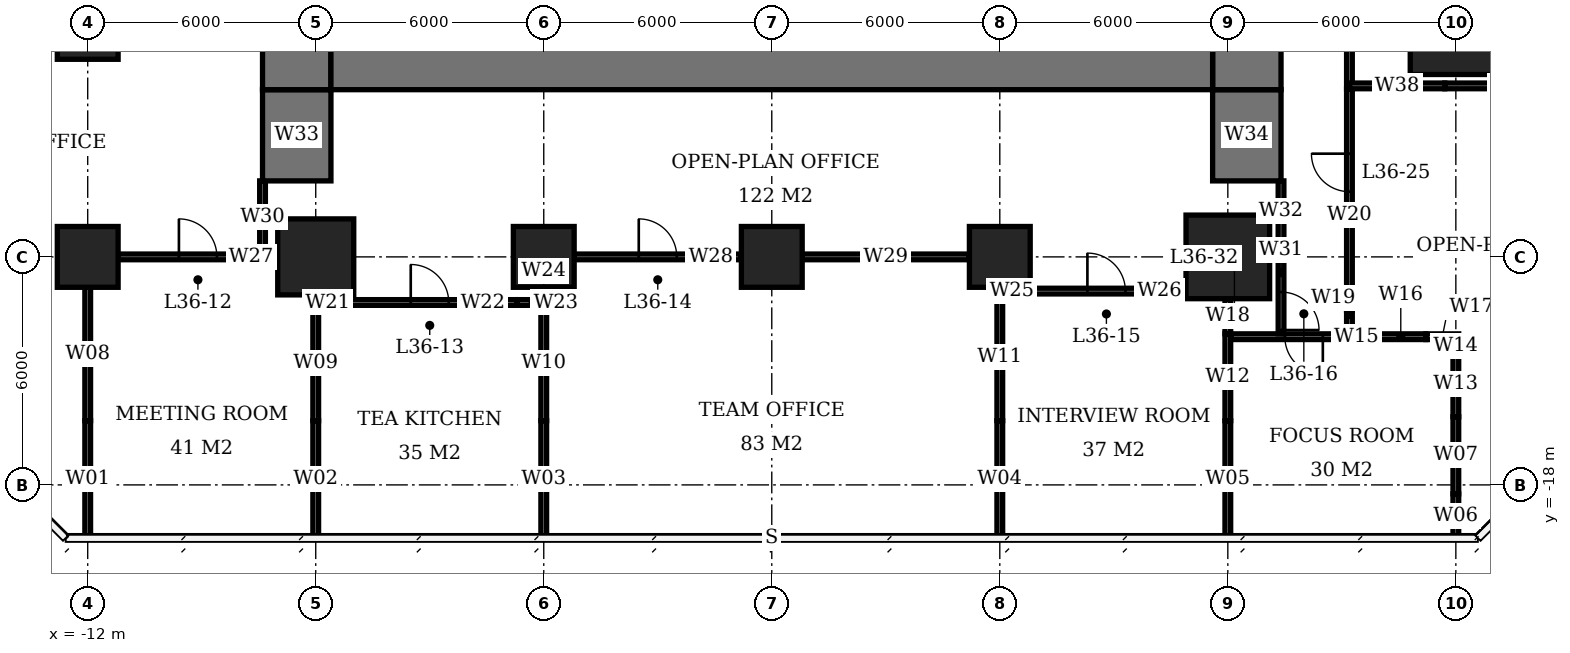
"""IFC4 building model, lengths in metres.
Left out: names, types, materials, properties, quantities, classifications, styles, units other than length and angle.
Written with IfcOpenShell. Run it as: python <this file> out.ifc"""

import sys

from ifc_helpers import new_model, si_unit, direction, frame, frame_2d, origin, origin_2d, place, context, subcontext, project, spatial, rectangle, extrude, element, fill, save


model = new_model("IFC4")
c1 = context("Model", 3, precision=1e-05, world=origin(), true_north=direction((0.0, 1.0)))
c2 = subcontext(c1, "Body", "Model", "MODEL_VIEW")
j1 = project(units=[si_unit("LENGTHUNIT", "METRE"), si_unit("PLANEANGLEUNIT", "RADIAN")], contexts=[c1])
p1 = place(None, origin())
s1 = spatial("IfcSite", under=j1, at=p1, CompositionType="ELEMENT")
p2 = place(p1, origin())
s2 = spatial("IfcBuilding", under=s1, at=p2, CompositionType="ELEMENT")
p3 = place(p2, frame((0.0, 0.0, 148.4)))
s3 = spatial("IfcBuildingStorey", under=s2, at=p3, CompositionType="ELEMENT", Elevation=148.4)
for number, where, z_axis, x_axis in (
    (1, (-12.0, -12.0, 0.0), (0.0, 0.0, 1.0), (1.0, 0.0, 0.0)),
    (2, (-12.0, -6.0, 0.0), (0.0, 0.0, 1.0), (1.0, 0.0, 0.0)),
):
    element("IfcColumn", number, at=place(p3, frame(where, z_axis=z_axis, x_axis=x_axis)), inside=s3, PredefinedType="COLUMN", context=c2, shape_type="SweptSolid", body=[
        extrude(rectangle(XDim=1.6, YDim=1.6, at=origin_2d()), origin(), (0.0, 0.0, 1.0), 3.9),
    ])
p4 = place(p3, frame((-6.0, -12.0, 0.0), z_axis=(0.0, 0.0, 1.0), x_axis=(1.0, 0.0, 0.0)))
e3 = element("IfcColumn", 3, at=p4, inside=s3, PredefinedType="COLUMN", context=c2, shape_type="SweptSolid", body=[
    extrude(rectangle(XDim=2.0, YDim=2.0, at=origin_2d()), origin(), (0.0, 0.0, 1.0), 3.9),
])
for number, where, z_axis, x_axis in (
    (4, (0.0, -12.0, 0.0), (0.0, 0.0, 1.0), (1.0, 0.0, 0.0)),
    (5, (6.0, -12.0, 0.0), (0.0, 0.0, 1.0), (1.0, 0.0, 0.0)),
    (6, (12.0, -12.0, 0.0), (0.0, 0.0, 1.0), (1.0, 0.0, 0.0)),
):
    element("IfcColumn", number, at=place(p3, frame(where, z_axis=z_axis, x_axis=x_axis)), inside=s3, PredefinedType="COLUMN", context=c2, shape_type="SweptSolid", body=[
        extrude(rectangle(XDim=1.6, YDim=1.6, at=origin_2d()), origin(), (0.0, 0.0, 1.0), 3.9),
    ])
p5 = place(p3, frame((18.0, -12.0, 0.0), z_axis=(0.0, 0.0, 1.0), x_axis=(1.0, 0.0, 0.0)))
e7 = element("IfcColumn", 7, at=p5, inside=s3, PredefinedType="COLUMN", context=c2, shape_type="SweptSolid", body=[
    extrude(rectangle(XDim=2.2, YDim=2.2, at=origin_2d()), origin(), (0.0, 0.0, 1.0), 3.9),
])
p6 = place(p3, frame((24.0, -6.0, 0.0), z_axis=(0.0, 0.0, 1.0), x_axis=(1.0, 0.0, 0.0)))
e8 = element("IfcColumn", 8, at=p6, inside=s3, PredefinedType="COLUMN", context=c2, shape_type="SweptSolid", body=[
    extrude(rectangle(XDim=2.4, YDim=2.4, at=origin_2d()), origin(), (0.0, 0.0, 1.0), 3.9),
])
p7 = place(p3, frame((-5.6, -6.6, 0.0), z_axis=(0.0, 0.0, 1.0), x_axis=(1.0, 0.0, 0.0)))
e9 = element("IfcWall", 9, at=p7, inside=s3, PredefinedType="SHEAR", context=c2, shape_type="SweptSolid", body=[
    extrude(rectangle(XDim=23.2, YDim=2.0, at=frame_2d((11.6, 0.0))), origin(), (0.0, 0.0, 1.0), 3.9),
])
p8 = place(p3, frame((-6.5, -7.6, 0.0), z_axis=(0.0, 0.0, 1.0), x_axis=(0.0, 1.0, 0.0)))
e10 = element("IfcWall", 10, at=p8, inside=s3, PredefinedType="SHEAR", context=c2, shape_type="SweptSolid", body=[
    extrude(rectangle(XDim=21.2, YDim=1.8, at=frame_2d((10.6, 0.0))), origin(), (0.0, 0.0, 1.0), 3.9),
])
p9 = place(p8, frame((7.8, 0.0, 0.0)))
e11 = element("IfcOpeningElement", 11, at=p9, cuts=e10, PredefinedType="OPENING", context=c2, shape_type="SweptSolid", body=[
    extrude(rectangle(XDim=1.8, YDim=2.4, at=frame_2d((0.9, 1.2))), frame((0.0, 0.91, 0.0), z_axis=(0.0, -1.0, 0.0), x_axis=(1.0, 0.0, 0.0)), (0.0, 0.0, 1.0), 1.82),
])
p10 = place(p3, frame((18.5, -7.6, 0.0), z_axis=(0.0, 0.0, 1.0), x_axis=(0.0, 1.0, 0.0)))
e12 = element("IfcWall", 12, at=p10, inside=s3, PredefinedType="SHEAR", context=c2, shape_type="SweptSolid", body=[
    extrude(rectangle(XDim=21.2, YDim=1.8, at=frame_2d((10.6, 0.0))), origin(), (0.0, 0.0, 1.0), 3.9),
])
p11 = place(p10, frame((9.2, 0.0, 0.0)))
e13 = element("IfcOpeningElement", 13, at=p11, cuts=e12, PredefinedType="OPENING", context=c2, shape_type="SweptSolid", body=[
    extrude(rectangle(XDim=1.8, YDim=2.4, at=frame_2d((0.9, 1.2))), frame((0.0, 0.91, 0.0), z_axis=(0.0, -1.0, 0.0), x_axis=(1.0, 0.0, 0.0)), (0.0, 0.0, 1.0), 1.82),
])
for number, where, z_axis, x_axis in (
    (14, (-6.5, -10.0, 0.0), (0.0, 0.0, 1.0), (0.0, 1.0, 0.0)),
    (15, (18.5, -10.0, 0.0), (0.0, 0.0, 1.0), (0.0, 1.0, 0.0)),
):
    element("IfcWall", number, at=place(p3, frame(where, z_axis=z_axis, x_axis=x_axis)), inside=s3, PredefinedType="SHEAR", context=c2, shape_type="SweptSolid", body=[
        extrude(rectangle(XDim=2.4, YDim=1.8, at=frame_2d((1.2, 0.0))), origin(), (0.0, 0.0, 1.0), 3.9),
    ])
p12 = place(p3, frame((21.892, -14.1, 0.0), z_axis=(0.0, 0.0, 1.0), x_axis=(-1.0, 0.0, 0.0)))
e16 = element("IfcWall", 16, at=p12, inside=s3, PredefinedType="PARTITIONING", context=c2, shape_type="SweptSolid", body=[
    extrude(rectangle(XDim=3.817, YDim=0.15, at=frame_2d((1.909, 0.0))), origin(), (0.0, 0.0, 1.0), 2.65),
])
p13 = place(p12, frame((1.392, 0.0, 0.0)))
e17 = element("IfcOpeningElement", 17, at=p13, cuts=e16, PredefinedType="OPENING", context=c2, shape_type="SweptSolid", body=[
    extrude(rectangle(XDim=1.0, YDim=2.1, at=frame_2d((0.5, 1.05))), frame((0.0, 0.085, 0.0), z_axis=(0.0, -1.0, 0.0), x_axis=(1.0, 0.0, 0.0)), (0.0, 0.0, 1.0), 0.17),
])
p14 = place(p3, frame((21.892, -14.1, 0.0), z_axis=(0.0, 0.0, 1.0), x_axis=(1.0, 0.0, 0.0)))
e18 = element("IfcWall", 18, at=p14, inside=s3, PredefinedType="PARTITIONING", context=c2, shape_type="SweptSolid", body=[
    extrude(rectangle(XDim=1.318, YDim=0.15, at=frame_2d((0.659, 0.0))), origin(), (0.0, 0.0, 1.0), 3.65),
])
p15 = place(p3, frame((23.21, -14.1, 0.0), z_axis=(0.0, 0.0, 1.0), x_axis=(1.0, 0.0, 0.0)))
e19 = element("IfcWall", 19, at=p15, inside=s3, PredefinedType="PARTITIONING", context=c2, shape_type="SweptSolid", body=[
    extrude(rectangle(XDim=0.865, YDim=0.15, at=frame_2d((0.433, 0.0))), origin(), (0.0, 0.0, 1.0), 2.65),
])
p16 = place(p3, frame((-6.075, -13.2, 0.0), z_axis=(0.0, 0.0, 1.0), x_axis=(1.0, 0.0, 0.0)))
e20 = element("IfcWall", 20, at=p16, inside=s3, PredefinedType="PARTITIONING", context=c2, shape_type="SweptSolid", body=[
    extrude(rectangle(XDim=0.785, YDim=0.15, at=frame_2d((0.393, 0.0))), origin(), (0.0, 0.0, 1.0), 2.65),
])
p17 = place(p3, frame((-5.29, -13.2, 0.0), z_axis=(0.0, 0.0, 1.0), x_axis=(1.0, 0.0, 0.0)))
e21 = element("IfcWall", 21, at=p17, inside=s3, PredefinedType="PARTITIONING", context=c2, shape_type="SweptSolid", body=[
    extrude(rectangle(XDim=4.58, YDim=0.15, at=frame_2d((2.29, 0.0))), origin(), (0.0, 0.0, 1.0), 3.65),
])
p18 = place(p17, frame((1.79, 0.0, 0.0)))
e22 = element("IfcOpeningElement", 22, at=p18, cuts=e21, PredefinedType="OPENING", context=c2, shape_type="SweptSolid", body=[
    extrude(rectangle(XDim=1.0, YDim=2.1, at=frame_2d((0.5, 1.05))), frame((0.0, 0.085, 0.0), z_axis=(0.0, -1.0, 0.0), x_axis=(1.0, 0.0, 0.0)), (0.0, 0.0, 1.0), 0.17),
])
p19 = place(p3, frame((-0.71, -13.2, 0.0), z_axis=(0.0, 0.0, 1.0), x_axis=(1.0, 0.0, 0.0)))
e23 = element("IfcWall", 23, at=p19, inside=s3, PredefinedType="PARTITIONING", context=c2, shape_type="SweptSolid", body=[
    extrude(rectangle(XDim=0.86, YDim=0.15, at=frame_2d((0.43, 0.0))), origin(), (0.0, 0.0, 1.0), 2.65),
])
p20 = place(p3, frame((11.925, -12.9, 0.0), z_axis=(0.0, 0.0, 1.0), x_axis=(1.0, 0.0, 0.0)))
e24 = element("IfcWall", 24, at=p20, inside=s3, PredefinedType="PARTITIONING", context=c2, shape_type="SweptSolid", body=[
    extrude(rectangle(XDim=0.785, YDim=0.15, at=frame_2d((0.393, 0.0))), origin(), (0.0, 0.0, 1.0), 2.65),
])
p21 = place(p3, frame((12.71, -12.9, 0.0), z_axis=(0.0, 0.0, 1.0), x_axis=(1.0, 0.0, 0.0)))
e25 = element("IfcWall", 25, at=p21, inside=s3, PredefinedType="PARTITIONING", context=c2, shape_type="SweptSolid", body=[
    extrude(rectangle(XDim=4.19, YDim=0.15, at=frame_2d((2.095, 0.0))), origin(), (0.0, 0.0, 1.0), 3.65),
])
p22 = place(p21, frame((1.595, 0.0, 0.0)))
e26 = element("IfcOpeningElement", 26, at=p22, cuts=e25, PredefinedType="OPENING", context=c2, shape_type="SweptSolid", body=[
    extrude(rectangle(XDim=1.0, YDim=2.1, at=frame_2d((0.5, 1.05))), frame((0.0, 0.085, 0.0), z_axis=(0.0, -1.0, 0.0), x_axis=(1.0, 0.0, 0.0)), (0.0, 0.0, 1.0), 0.17),
])
p23 = place(p3, frame((-11.2, -12.0, 0.0), z_axis=(0.0, 0.0, 1.0), x_axis=(1.0, 0.0, 0.0)))
e27 = element("IfcWall", 27, at=p23, inside=s3, PredefinedType="PARTITIONING", context=c2, shape_type="SweptSolid", body=[
    extrude(rectangle(XDim=4.2, YDim=0.15, at=frame_2d((2.1, 0.0))), origin(), (0.0, 0.0, 1.0), 3.65),
])
p24 = place(p23, frame((1.6, 0.0, 0.0)))
e28 = element("IfcOpeningElement", 28, at=p24, cuts=e27, PredefinedType="OPENING", context=c2, shape_type="SweptSolid", body=[
    extrude(rectangle(XDim=1.0, YDim=2.1, at=frame_2d((0.5, 1.05))), frame((0.0, 0.085, 0.0), z_axis=(0.0, -1.0, 0.0), x_axis=(1.0, 0.0, 0.0)), (0.0, 0.0, 1.0), 0.17),
])
p25 = place(p3, frame((0.8, -12.0, 0.0), z_axis=(0.0, 0.0, 1.0), x_axis=(1.0, 0.0, 0.0)))
e29 = element("IfcWall", 29, at=p25, inside=s3, PredefinedType="PARTITIONING", context=c2, shape_type="SweptSolid", body=[
    extrude(rectangle(XDim=4.4, YDim=0.15, at=frame_2d((2.2, 0.0))), origin(), (0.0, 0.0, 1.0), 3.65),
])
p26 = place(p25, frame((1.7, 0.0, 0.0)))
e30 = element("IfcOpeningElement", 30, at=p26, cuts=e29, PredefinedType="OPENING", context=c2, shape_type="SweptSolid", body=[
    extrude(rectangle(XDim=1.0, YDim=2.1, at=frame_2d((0.5, 1.05))), frame((0.0, 0.085, 0.0), z_axis=(0.0, -1.0, 0.0), x_axis=(1.0, 0.0, 0.0)), (0.0, 0.0, 1.0), 0.17),
])
p27 = place(p3, frame((6.8, -12.0, 0.0), z_axis=(0.0, 0.0, 1.0), x_axis=(1.0, 0.0, 0.0)))
e31 = element("IfcWall", 31, at=p27, inside=s3, PredefinedType="PARTITIONING", context=c2, shape_type="SweptSolid", body=[
    extrude(rectangle(XDim=4.4, YDim=0.15, at=frame_2d((2.2, 0.0))), origin(), (0.0, 0.0, 1.0), 3.65),
])
p28 = place(p3, frame((-12.0, -19.4, 0.0), z_axis=(0.0, 0.0, 1.0), x_axis=(0.0, 1.0, 0.0)))
e32 = element("IfcWall", 32, at=p28, inside=s3, PredefinedType="PARTITIONING", context=c2, shape_type="SweptSolid", body=[
    extrude(rectangle(XDim=3.09, YDim=0.15, at=frame_2d((1.545, 0.0))), origin(), (0.0, 0.0, 1.0), 3.65),
])
p29 = place(p3, frame((-12.0, -16.31, 0.0), z_axis=(0.0, 0.0, 1.0), x_axis=(0.0, 1.0, 0.0)))
e33 = element("IfcWall", 33, at=p29, inside=s3, PredefinedType="PARTITIONING", context=c2, shape_type="SweptSolid", body=[
    extrude(rectangle(XDim=3.51, YDim=0.15, at=frame_2d((1.755, 0.0))), origin(), (0.0, 0.0, 1.0), 2.65),
])
p30 = place(p3, frame((-6.0, -19.4, 0.0), z_axis=(0.0, 0.0, 1.0), x_axis=(0.0, 1.0, 0.0)))
e34 = element("IfcWall", 34, at=p30, inside=s3, PredefinedType="PARTITIONING", context=c2, shape_type="SweptSolid", body=[
    extrude(rectangle(XDim=3.09, YDim=0.15, at=frame_2d((1.545, 0.0))), origin(), (0.0, 0.0, 1.0), 3.65),
])
p31 = place(p3, frame((-6.0, -16.31, 0.0), z_axis=(0.0, 0.0, 1.0), x_axis=(0.0, 1.0, 0.0)))
e35 = element("IfcWall", 35, at=p31, inside=s3, PredefinedType="PARTITIONING", context=c2, shape_type="SweptSolid", body=[
    extrude(rectangle(XDim=3.035, YDim=0.15, at=frame_2d((1.518, 0.0))), origin(), (0.0, 0.0, 1.0), 2.65),
])
p32 = place(p3, frame((0.0, -19.4, 0.0), z_axis=(0.0, 0.0, 1.0), x_axis=(0.0, 1.0, 0.0)))
e36 = element("IfcWall", 36, at=p32, inside=s3, PredefinedType="PARTITIONING", context=c2, shape_type="SweptSolid", body=[
    extrude(rectangle(XDim=3.09, YDim=0.15, at=frame_2d((1.545, 0.0))), origin(), (0.0, 0.0, 1.0), 3.65),
])
p33 = place(p3, frame((0.0, -16.31, 0.0), z_axis=(0.0, 0.0, 1.0), x_axis=(0.0, 1.0, 0.0)))
e37 = element("IfcWall", 37, at=p33, inside=s3, PredefinedType="PARTITIONING", context=c2, shape_type="SweptSolid", body=[
    extrude(rectangle(XDim=3.035, YDim=0.15, at=frame_2d((1.518, 0.0))), origin(), (0.0, 0.0, 1.0), 2.65),
])
p34 = place(p3, frame((0.0, -13.125, 0.0), z_axis=(0.0, 0.0, 1.0), x_axis=(0.0, 1.0, 0.0)))
e38 = element("IfcWall", 38, at=p34, inside=s3, PredefinedType="PARTITIONING", context=c2, shape_type="SweptSolid", body=[
    extrude(rectangle(XDim=0.325, YDim=0.15, at=frame_2d((0.163, 0.0))), origin(), (0.0, 0.0, 1.0), 2.65),
])
p35 = place(p3, frame((12.0, -19.4, 0.0), z_axis=(0.0, 0.0, 1.0), x_axis=(0.0, 1.0, 0.0)))
e39 = element("IfcWall", 39, at=p35, inside=s3, PredefinedType="PARTITIONING", context=c2, shape_type="SweptSolid", body=[
    extrude(rectangle(XDim=3.09, YDim=0.15, at=frame_2d((1.545, 0.0))), origin(), (0.0, 0.0, 1.0), 3.65),
])
p36 = place(p3, frame((12.0, -16.31, 0.0), z_axis=(0.0, 0.0, 1.0), x_axis=(0.0, 1.0, 0.0)))
e40 = element("IfcWall", 40, at=p36, inside=s3, PredefinedType="PARTITIONING", context=c2, shape_type="SweptSolid", body=[
    extrude(rectangle(XDim=3.335, YDim=0.15, at=frame_2d((1.667, 0.0))), origin(), (0.0, 0.0, 1.0), 2.65),
])
p37 = place(p3, frame((18.0, -19.4, 0.0), z_axis=(0.0, 0.0, 1.0), x_axis=(0.0, 1.0, 0.0)))
e41 = element("IfcWall", 41, at=p37, inside=s3, PredefinedType="PARTITIONING", context=c2, shape_type="SweptSolid", body=[
    extrude(rectangle(XDim=3.09, YDim=0.15, at=frame_2d((1.545, 0.0))), origin(), (0.0, 0.0, 1.0), 3.65),
])
p38 = place(p3, frame((18.0, -16.31, 0.0), z_axis=(0.0, 0.0, 1.0), x_axis=(0.0, 1.0, 0.0)))
e42 = element("IfcWall", 42, at=p38, inside=s3, PredefinedType="PARTITIONING", context=c2, shape_type="SweptSolid", body=[
    extrude(rectangle(XDim=2.285, YDim=0.15, at=frame_2d((1.143, 0.0))), origin(), (0.0, 0.0, 1.0), 2.65),
])
p39 = place(p3, frame((18.0, -14.025, 0.0), z_axis=(0.0, 0.0, 1.0), x_axis=(0.0, 1.0, 0.0)))
e43 = element("IfcWall", 43, at=p39, inside=s3, PredefinedType="PARTITIONING", context=c2, shape_type="SweptSolid", body=[
    extrude(rectangle(XDim=0.925, YDim=0.15, at=frame_2d((0.462, 0.0))), origin(), (0.0, 0.0, 1.0), 2.65),
])
p40 = place(p3, frame((24.0, -19.4, 0.0), z_axis=(0.0, 0.0, 1.0), x_axis=(0.0, 1.0, 0.0)))
e44 = element("IfcWall", 44, at=p40, inside=s3, PredefinedType="PARTITIONING", context=c2, shape_type="SweptSolid", body=[
    extrude(rectangle(XDim=1.163, YDim=0.15, at=frame_2d((0.582, 0.0))), origin(), (0.0, 0.0, 1.0), 3.65),
])
p41 = place(p3, frame((24.0, -18.237, 0.0), z_axis=(0.0, 0.0, 1.0), x_axis=(0.0, 1.0, 0.0)))
e45 = element("IfcWall", 45, at=p41, inside=s3, PredefinedType="PARTITIONING", context=c2, shape_type="SweptSolid", body=[
    extrude(rectangle(XDim=2.029, YDim=0.15, at=frame_2d((1.015, 0.0))), origin(), (0.0, 0.0, 1.0), 2.65),
])
p42 = place(p3, frame((24.0, -16.208, 0.0), z_axis=(0.0, 0.0, 1.0), x_axis=(0.0, 1.0, 0.0)))
e46 = element("IfcWall", 46, at=p42, inside=s3, PredefinedType="PARTITIONING", context=c2, shape_type="SweptSolid", body=[
    extrude(rectangle(XDim=1.718, YDim=0.15, at=frame_2d((0.859, 0.0))), origin(), (0.0, 0.0, 1.0), 3.65),
])
p43 = place(p3, frame((24.0, -14.49, 0.0), z_axis=(0.0, 0.0, 1.0), x_axis=(0.0, 1.0, 0.0)))
e47 = element("IfcWall", 47, at=p43, inside=s3, PredefinedType="PARTITIONING", context=c2, shape_type="SweptSolid", body=[
    extrude(rectangle(XDim=0.315, YDim=0.15, at=frame_2d((0.157, 0.0))), origin(), (0.0, 0.0, 1.0), 2.65),
])
p44 = place(p3, frame((-7.4, -11.925, 0.0), z_axis=(0.0, 0.0, 1.0), x_axis=(0.0, 1.0, 0.0)))
e48 = element("IfcWall", 48, at=p44, inside=s3, PredefinedType="PARTITIONING", context=c2, shape_type="SweptSolid", body=[
    extrude(rectangle(XDim=1.925, YDim=0.15, at=frame_2d((0.962, 0.0))), origin(), (0.0, 0.0, 1.0), 3.65),
])
p45 = place(p3, frame((19.4, -11.608, 0.0), z_axis=(0.0, 0.0, 1.0), x_axis=(0.0, -1.0, 0.0)))
e49 = element("IfcWall", 49, at=p45, inside=s3, PredefinedType="PARTITIONING", context=c2, shape_type="SweptSolid", body=[
    extrude(rectangle(XDim=2.417, YDim=0.15, at=frame_2d((1.208, 0.0))), origin(), (0.0, 0.0, 1.0), 2.65),
])
p46 = place(p45, frame((1.317, 0.0, 0.0)))
e50 = element("IfcOpeningElement", 50, at=p46, cuts=e49, PredefinedType="OPENING", context=c2, shape_type="SweptSolid", body=[
    extrude(rectangle(XDim=1.0, YDim=2.1, at=frame_2d((0.5, 1.05))), frame((0.0, 0.085, 0.0), z_axis=(0.0, -1.0, 0.0), x_axis=(1.0, 0.0, 0.0)), (0.0, 0.0, 1.0), 0.17),
])
p47 = place(p3, frame((19.4, -11.608, 0.0), z_axis=(0.0, 0.0, 1.0), x_axis=(0.0, 1.0, 0.0)))
e51 = element("IfcWall", 51, at=p47, inside=s3, PredefinedType="PARTITIONING", context=c2, shape_type="SweptSolid", body=[
    extrude(rectangle(XDim=1.608, YDim=0.15, at=frame_2d((0.804, 0.0))), origin(), (0.0, 0.0, 1.0), 3.65),
])
p48 = place(p3, frame((21.2, -14.025, 0.0), z_axis=(0.0, 0.0, 1.0), x_axis=(0.0, 1.0, 0.0)))
e52 = element("IfcWall", 52, at=p48, inside=s3, PredefinedType="PARTITIONING", context=c2, shape_type="SweptSolid", body=[
    extrude(rectangle(XDim=0.617, YDim=0.15, at=frame_2d((0.309, 0.0))), origin(), (0.0, 0.0, 1.0), 2.65),
])
p49 = place(p3, frame((21.2, -13.408, 0.0), z_axis=(0.0, 0.0, 1.0), x_axis=(0.0, 1.0, 0.0)))
e53 = element("IfcWall", 53, at=p49, inside=s3, PredefinedType="PARTITIONING", context=c2, shape_type="SweptSolid", body=[
    extrude(rectangle(XDim=5.833, YDim=0.15, at=frame_2d((2.917, 0.0))), origin(), (0.0, 0.0, 1.0), 3.65),
])
p50 = place(p49, frame((3.124, 0.0, 0.0)))
e54 = element("IfcOpeningElement", 54, at=p50, cuts=e53, PredefinedType="OPENING", context=c2, shape_type="SweptSolid", body=[
    extrude(rectangle(XDim=1.0, YDim=2.1, at=frame_2d((0.5, 1.05))), frame((0.0, 0.085, 0.0), z_axis=(0.0, -1.0, 0.0), x_axis=(1.0, 0.0, 0.0)), (0.0, 0.0, 1.0), 0.17),
])
p51 = place(p3, frame((21.2, -7.575, 0.0), z_axis=(0.0, 0.0, 1.0), x_axis=(0.0, 1.0, 0.0)))
e55 = element("IfcWall", 55, at=p51, inside=s3, PredefinedType="PARTITIONING", context=c2, shape_type="SweptSolid", body=[
    extrude(rectangle(XDim=4.875, YDim=0.15, at=frame_2d((2.438, 0.0))), origin(), (0.0, 0.0, 1.0), 3.65),
])
p52 = place(p3, frame((21.2, -7.5, 0.0), z_axis=(0.0, 0.0, 1.0), x_axis=(1.0, 0.0, 0.0)))
e56 = element("IfcWall", 56, at=p52, inside=s3, PredefinedType="PARTITIONING", context=c2, shape_type="SweptSolid", body=[
    extrude(rectangle(XDim=2.508, YDim=0.15, at=frame_2d((1.254, 0.0))), origin(), (0.0, 0.0, 1.0), 3.65),
])
p53 = place(p3, frame((23.708, -7.5, 0.0), z_axis=(0.0, 0.0, 1.0), x_axis=(1.0, 0.0, 0.0)))
e57 = element("IfcWall", 57, at=p53, inside=s3, PredefinedType="PARTITIONING", context=c2, shape_type="SweptSolid", body=[
    extrude(rectangle(XDim=3.584, YDim=0.15, at=frame_2d((1.792, 0.0))), origin(), (0.0, 0.0, 1.0), 2.65),
])
p54 = place(p24, origin())
e58 = element("IfcDoor", 58, at=p54, inside=s3, OperationType="SINGLE_SWING_LEFT", PredefinedType="DOOR", context=c2, shape_type="SweptSolid", body=[
    extrude(rectangle(XDim=1.0, YDim=2.1, at=frame_2d((0.5, 1.05))), frame((0.0, 0.025, 0.0), z_axis=(0.0, -1.0, 0.0), x_axis=(1.0, 0.0, 0.0)), (0.0, 0.0, 1.0), 0.05),
])
fill(e28, e58)
p55 = place(p18, origin())
e59 = element("IfcDoor", 59, at=p55, inside=s3, OperationType="SINGLE_SWING_LEFT", PredefinedType="DOOR", context=c2, shape_type="SweptSolid", body=[
    extrude(rectangle(XDim=1.0, YDim=2.1, at=frame_2d((0.5, 1.05))), frame((0.0, 0.025, 0.0), z_axis=(0.0, -1.0, 0.0), x_axis=(1.0, 0.0, 0.0)), (0.0, 0.0, 1.0), 0.05),
])
fill(e22, e59)
p56 = place(p26, origin())
e60 = element("IfcDoor", 60, at=p56, inside=s3, OperationType="SINGLE_SWING_LEFT", PredefinedType="DOOR", context=c2, shape_type="SweptSolid", body=[
    extrude(rectangle(XDim=1.0, YDim=2.1, at=frame_2d((0.5, 1.05))), frame((0.0, 0.025, 0.0), z_axis=(0.0, -1.0, 0.0), x_axis=(1.0, 0.0, 0.0)), (0.0, 0.0, 1.0), 0.05),
])
fill(e30, e60)
p57 = place(p22, origin())
e61 = element("IfcDoor", 61, at=p57, inside=s3, OperationType="SINGLE_SWING_LEFT", PredefinedType="DOOR", context=c2, shape_type="SweptSolid", body=[
    extrude(rectangle(XDim=1.0, YDim=2.1, at=frame_2d((0.5, 1.05))), frame((0.0, 0.025, 0.0), z_axis=(0.0, -1.0, 0.0), x_axis=(1.0, 0.0, 0.0)), (0.0, 0.0, 1.0), 0.05),
])
fill(e26, e61)
p58 = place(p13, origin())
e62 = element("IfcDoor", 62, at=p58, inside=s3, OperationType="SINGLE_SWING_LEFT", PredefinedType="DOOR", context=c2, shape_type="SweptSolid", body=[
    extrude(rectangle(XDim=1.0, YDim=2.1, at=frame_2d((0.5, 1.05))), frame((0.0, 0.025, 0.0), z_axis=(0.0, -1.0, 0.0), x_axis=(1.0, 0.0, 0.0)), (0.0, 0.0, 1.0), 0.05),
])
fill(e17, e62)
p59 = place(p50, origin())
e63 = element("IfcDoor", 63, at=p59, inside=s3, OperationType="SINGLE_SWING_RIGHT", PredefinedType="DOOR", context=c2, shape_type="SweptSolid", body=[
    extrude(rectangle(XDim=1.0, YDim=2.1, at=frame_2d((0.5, 1.05))), frame((0.0, 0.025, 0.0), z_axis=(0.0, -1.0, 0.0), x_axis=(1.0, 0.0, 0.0)), (0.0, 0.0, 1.0), 0.05),
])
fill(e54, e63)
p60 = place(p46, origin())
e64 = element("IfcDoor", 64, at=p60, inside=s3, OperationType="SINGLE_SWING_RIGHT", PredefinedType="DOOR", context=c2, shape_type="SweptSolid", body=[
    extrude(rectangle(XDim=1.0, YDim=2.1, at=frame_2d((0.5, 1.05))), frame((0.0, 0.025, 0.0), z_axis=(0.0, -1.0, 0.0), x_axis=(1.0, 0.0, 0.0)), (0.0, 0.0, 1.0), 0.05),
])
fill(e50, e64)
save(model, sys.argv[1])
